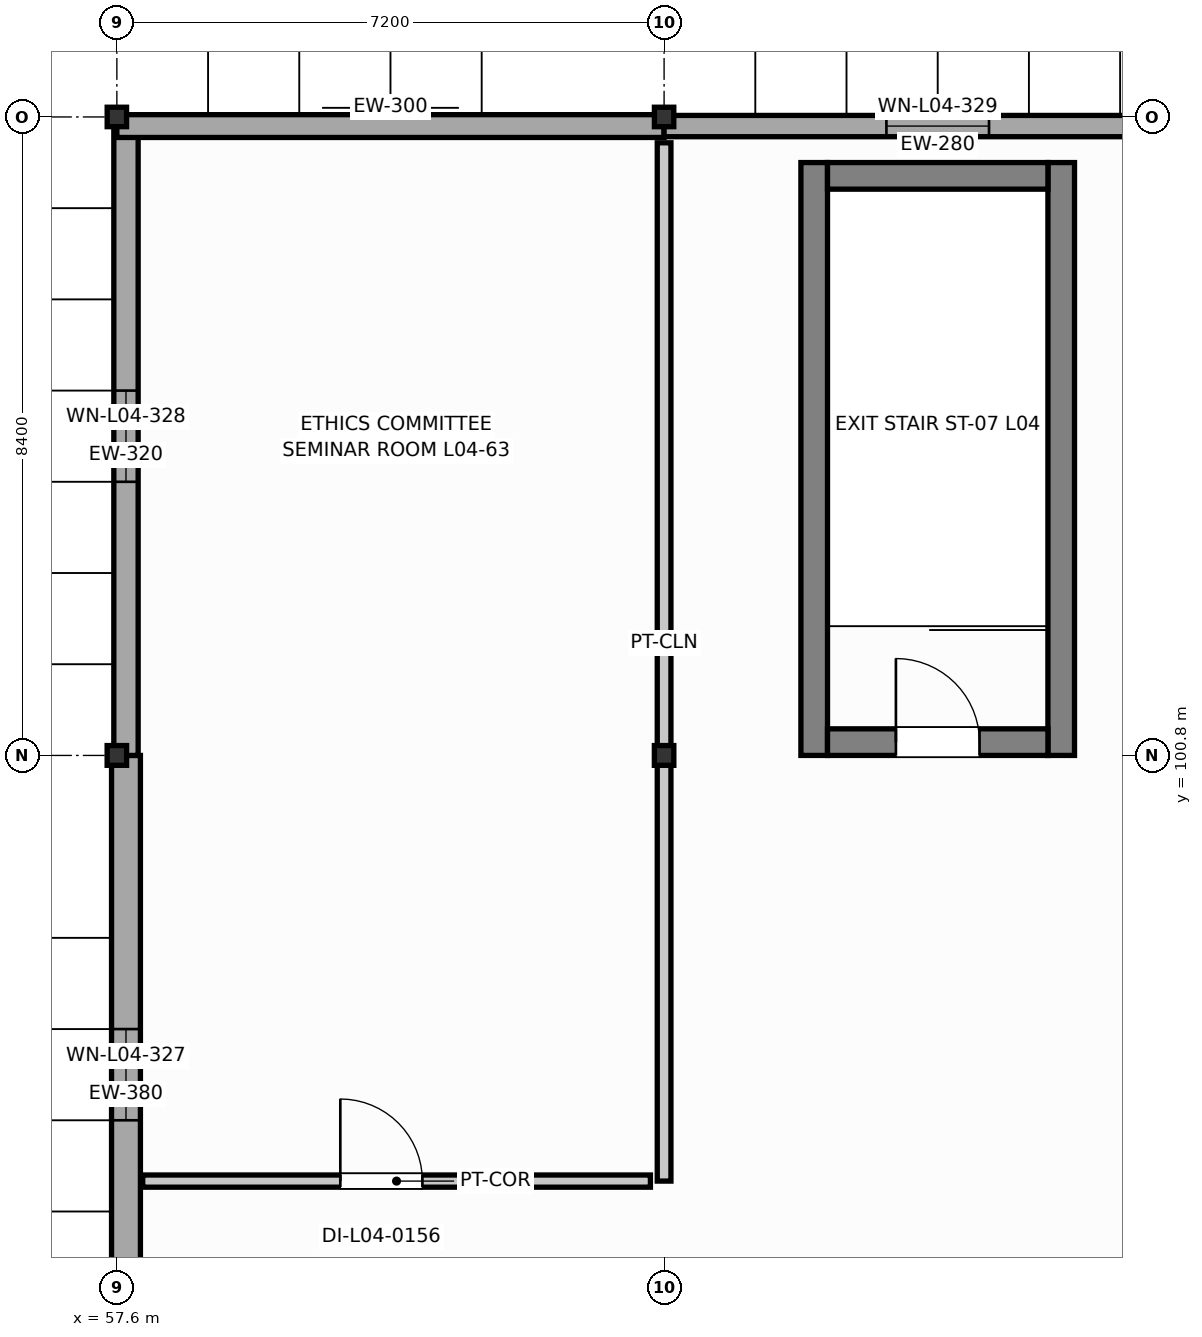
"""IFC4 building model, lengths in metres.
Left out: names, types, materials, properties, quantities, classifications, styles, units other than length and angle.
Written with IfcOpenShell. Run it as: python <this file> out.ifc"""

import sys

from ifc_helpers import new_model, si_unit, direction, frame, frame_2d, origin, origin_2d, place, context, subcontext, project, spatial, rectangle, i_section, extrude, element, fill, save


model = new_model("IFC4")
c1 = context("Model", 3, precision=1e-05, world=origin(), true_north=direction((0.0, 1.0)))
c2 = subcontext(c1, "Body", "Model", "MODEL_VIEW")
j1 = project(units=[si_unit("LENGTHUNIT", "METRE"), si_unit("PLANEANGLEUNIT", "RADIAN")], contexts=[c1])
p1 = place(None, origin())
s1 = spatial("IfcSite", under=j1, at=p1, CompositionType="ELEMENT")
p2 = place(p1, origin())
s2 = spatial("IfcBuilding", under=s1, at=p2, CompositionType="ELEMENT")
p3 = place(p2, frame((0.0, 0.0, 17.4)))
s3 = spatial("IfcBuildingStorey", under=s2, at=p3, CompositionType="ELEMENT", Elevation=17.4)
p4 = place(p3, frame((57.6, 100.8, 0.0), z_axis=(0.0, 0.0, 1.0), x_axis=(1.0, 0.0, 0.0)))
e1 = element("IfcColumn", 1, at=p4, inside=s3, PredefinedType="COLUMN", context=c2, shape_type="SweptSolid", body=[
    extrude(i_section(OverallWidth=0.256, OverallDepth=0.26, WebThickness=0.011, FlangeThickness=0.017, FilletRadius=0.013, at=origin_2d()), origin(), (0.0, 0.0, 1.0), 4.2),
])
p5 = place(p3, frame((57.6, 109.2, 0.0), z_axis=(0.0, 0.0, 1.0), x_axis=(1.0, 0.0, 0.0)))
e2 = element("IfcColumn", 2, at=p5, inside=s3, PredefinedType="COLUMN", context=c2, shape_type="SweptSolid", body=[
    extrude(i_section(OverallWidth=0.255, OverallDepth=0.256, WebThickness=0.01, FlangeThickness=0.016, FilletRadius=0.013, at=origin_2d()), origin(), (0.0, 0.0, 1.0), 4.2),
])
p6 = place(p3, frame((64.8, 100.8, 0.0), z_axis=(0.0, 0.0, 1.0), x_axis=(1.0, 0.0, 0.0)))
e3 = element("IfcColumn", 3, at=p6, inside=s3, PredefinedType="COLUMN", context=c2, shape_type="SweptSolid", body=[
    extrude(i_section(OverallWidth=0.256, OverallDepth=0.26, WebThickness=0.011, FlangeThickness=0.017, FilletRadius=0.013, at=origin_2d()), origin(), (0.0, 0.0, 1.0), 4.2),
])
p7 = place(p3, frame((64.8, 109.2, 0.0), z_axis=(0.0, 0.0, 1.0), x_axis=(1.0, 0.0, 0.0)))
e4 = element("IfcColumn", 4, at=p7, inside=s3, PredefinedType="COLUMN", context=c2, shape_type="SweptSolid", body=[
    extrude(i_section(OverallWidth=0.255, OverallDepth=0.256, WebThickness=0.01, FlangeThickness=0.016, FilletRadius=0.013, at=origin_2d()), origin(), (0.0, 0.0, 1.0), 4.2),
])
for number, where, z_axis, x_axis in (
    (5, (66.775, 100.8, 0.0), (0.0, 0.0, 1.0), (0.0, 1.0, 0.0)),
    (6, (70.025, 100.8, 0.0), (0.0, 0.0, 1.0), (0.0, 1.0, 0.0)),
):
    element("IfcWall", number, at=place(p3, frame(where, z_axis=z_axis, x_axis=x_axis)), inside=s3, PredefinedType="SHEAR", context=c2, shape_type="SweptSolid", body=[
        extrude(rectangle(XDim=7.8, YDim=0.35, at=frame_2d((3.9, 0.0))), origin(), (0.0, 0.0, 1.0), 4.0),
    ])
p8 = place(p3, frame((66.95, 108.425, 0.0), z_axis=(0.0, 0.0, 1.0), x_axis=(1.0, 0.0, 0.0)))
e7 = element("IfcWall", 7, at=p8, inside=s3, PredefinedType="SHEAR", context=c2, shape_type="SweptSolid", body=[
    extrude(rectangle(XDim=2.9, YDim=0.35, at=frame_2d((1.45, 0.0))), origin(), (0.0, 0.0, 1.0), 4.0),
])
p9 = place(p3, frame((66.95, 100.975, 0.0), z_axis=(0.0, 0.0, 1.0), x_axis=(1.0, 0.0, 0.0)))
e8 = element("IfcWall", 8, at=p9, inside=s3, PredefinedType="SHEAR", context=c2, shape_type="SweptSolid", body=[
    extrude(rectangle(XDim=2.9, YDim=0.35, at=frame_2d((1.45, 0.0))), origin(), (0.0, 0.0, 1.0), 4.0),
])
p10 = place(p9, frame((0.9, 0.0, 0.0)))
e9 = element("IfcOpeningElement", 9, at=p10, cuts=e8, PredefinedType="OPENING", context=c2, shape_type="SweptSolid", body=[
    extrude(rectangle(XDim=1.1, YDim=2.15, at=frame_2d((0.55, 1.075))), frame((0.0, 0.185, 0.0), z_axis=(0.0, -1.0, 0.0), x_axis=(1.0, 0.0, 0.0)), (0.0, 0.0, 1.0), 0.37),
])
p11 = place(p3, frame((57.72, 92.4, 0.0), z_axis=(0.0, 0.0, 1.0), x_axis=(0.0, 1.0, 0.0)))
e10 = element("IfcWall", 10, at=p11, inside=s3, PredefinedType="SOLIDWALL", context=c2, shape_type="SweptSolid", body=[
    extrude(rectangle(XDim=8.4, YDim=0.38, at=frame_2d((4.2, 0.0))), origin(), (0.0, 0.0, 1.0), 3.091),
])
p12 = place(p11, frame((3.6, 0.0, 0.95)))
e11 = element("IfcOpeningElement", 11, at=p12, cuts=e10, PredefinedType="OPENING", context=c2, shape_type="SweptSolid", body=[
    extrude(rectangle(XDim=1.2, YDim=1.55, at=frame_2d((0.6, 0.775))), frame((0.0, 0.2, 0.0), z_axis=(0.0, -1.0, 0.0), x_axis=(1.0, 0.0, 0.0)), (0.0, 0.0, 1.0), 0.4),
])
p13 = place(p3, frame((57.72, 100.8, 0.0), z_axis=(0.0, 0.0, 1.0), x_axis=(0.0, 1.0, 0.0)))
e12 = element("IfcWall", 12, at=p13, inside=s3, PredefinedType="SOLIDWALL", context=c2, shape_type="SweptSolid", body=[
    extrude(rectangle(XDim=8.4, YDim=0.32, at=frame_2d((4.2, 0.0))), origin(), (0.0, 0.0, 1.0), 3.091),
])
p14 = place(p13, frame((3.6, 0.0, 0.95)))
e13 = element("IfcOpeningElement", 13, at=p14, cuts=e12, PredefinedType="OPENING", context=c2, shape_type="SweptSolid", body=[
    extrude(rectangle(XDim=1.2, YDim=1.75, at=frame_2d((0.6, 0.875))), frame((0.0, 0.17, 0.0), z_axis=(0.0, -1.0, 0.0), x_axis=(1.0, 0.0, 0.0)), (0.0, 0.0, 1.0), 0.34),
])
p15 = place(p3, frame((57.6, 109.08, 0.0), z_axis=(0.0, 0.0, 1.0), x_axis=(1.0, 0.0, 0.0)))
e14 = element("IfcWall", 14, at=p15, inside=s3, PredefinedType="SOLIDWALL", context=c2, shape_type="SweptSolid", body=[
    extrude(rectangle(XDim=7.2, YDim=0.3, at=frame_2d((3.6, 0.0))), origin(), (0.0, 0.0, 1.0), 3.482),
])
p16 = place(p3, frame((64.8, 109.08, 0.0), z_axis=(0.0, 0.0, 1.0), x_axis=(1.0, 0.0, 0.0)))
e15 = element("IfcWall", 15, at=p16, inside=s3, PredefinedType="SOLIDWALL", context=c2, shape_type="SweptSolid", body=[
    extrude(rectangle(XDim=7.2, YDim=0.28, at=frame_2d((3.6, 0.0))), origin(), (0.0, 0.0, 1.0), 3.482),
])
p17 = place(p16, frame((2.925, 0.0, 0.95)))
e16 = element("IfcOpeningElement", 16, at=p17, cuts=e15, PredefinedType="OPENING", context=c2, shape_type="SweptSolid", body=[
    extrude(rectangle(XDim=1.35, YDim=1.15, at=frame_2d((0.675, 0.575))), frame((0.0, 0.15, 0.0), z_axis=(0.0, -1.0, 0.0), x_axis=(1.0, 0.0, 0.0)), (0.0, 0.0, 1.0), 0.3),
])
p18 = place(p3, frame((64.8, 108.86, 0.0), z_axis=(0.0, 0.0, 1.0), x_axis=(0.0, -1.0, 0.0)))
e17 = element("IfcWall", 17, at=p18, inside=s3, PredefinedType="PARTITIONING", context=c2, shape_type="SweptSolid", body=[
    extrude(rectangle(XDim=13.66, YDim=0.18, at=frame_2d((6.83, 0.0))), origin(), (0.0, 0.0, 1.0), 3.175),
])
p19 = place(p3, frame((64.62, 95.2, 0.0), z_axis=(0.0, 0.0, 1.0), x_axis=(-1.0, 0.0, 0.0)))
e18 = element("IfcWall", 18, at=p19, inside=s3, PredefinedType="PARTITIONING", context=c2, shape_type="SweptSolid", body=[
    extrude(rectangle(XDim=6.68, YDim=0.16, at=frame_2d((3.34, 0.0))), origin(), (0.0, 0.0, 1.0), 3.175),
])
p20 = place(p19, frame((3.0, 0.0, 0.0)))
e19 = element("IfcOpeningElement", 19, at=p20, cuts=e18, PredefinedType="OPENING", context=c2, shape_type="SweptSolid", body=[
    extrude(rectangle(XDim=1.08, YDim=2.15, at=frame_2d((0.54, 1.075))), frame((0.0, 0.09, 0.0), z_axis=(0.0, -1.0, 0.0), x_axis=(1.0, 0.0, 0.0)), (0.0, 0.0, 1.0), 0.18),
])
p21 = place(p10, origin())
e20 = element("IfcDoor", 20, at=p21, inside=s3, OperationType="SINGLE_SWING_LEFT", PredefinedType="DOOR", context=c2, shape_type="SweptSolid", body=[
    extrude(rectangle(XDim=1.1, YDim=2.15, at=frame_2d((0.55, 1.075))), frame((0.0, 0.025, 0.0), z_axis=(0.0, -1.0, 0.0), x_axis=(1.0, 0.0, 0.0)), (0.0, 0.0, 1.0), 0.05),
])
fill(e9, e20)
p22 = place(p12, origin())
e21 = element("IfcWindow", 21, at=p22, inside=s3, PartitioningType="SINGLE_PANEL", PredefinedType="WINDOW", context=c2, shape_type="SweptSolid", body=[
    extrude(rectangle(XDim=1.2, YDim=1.55, at=frame_2d((0.6, 0.775))), frame((0.0, 0.03, 0.0), z_axis=(0.0, -1.0, 0.0), x_axis=(1.0, 0.0, 0.0)), (0.0, 0.0, 1.0), 0.06),
])
fill(e11, e21)
p23 = place(p14, origin())
e22 = element("IfcWindow", 22, at=p23, inside=s3, PartitioningType="SINGLE_PANEL", PredefinedType="WINDOW", context=c2, shape_type="SweptSolid", body=[
    extrude(rectangle(XDim=1.2, YDim=1.75, at=frame_2d((0.6, 0.875))), frame((0.0, 0.03, 0.0), z_axis=(0.0, -1.0, 0.0), x_axis=(1.0, 0.0, 0.0)), (0.0, 0.0, 1.0), 0.06),
])
fill(e13, e22)
p24 = place(p17, origin())
e23 = element("IfcWindow", 23, at=p24, inside=s3, PartitioningType="SINGLE_PANEL", PredefinedType="WINDOW", context=c2, shape_type="SweptSolid", body=[
    extrude(rectangle(XDim=1.35, YDim=1.15, at=frame_2d((0.675, 0.575))), frame((0.0, 0.03, 0.0), z_axis=(0.0, -1.0, 0.0), x_axis=(1.0, 0.0, 0.0)), (0.0, 0.0, 1.0), 0.06),
])
fill(e16, e23)
p25 = place(p20, frame((1.08, 0.0, 0.0), z_axis=(0.0, 0.0, 1.0), x_axis=(-1.0, 0.0, 0.0)))
e24 = element("IfcDoor", 24, at=p25, inside=s3, OperationType="SINGLE_SWING_LEFT", PredefinedType="DOOR", context=c2, shape_type="SweptSolid", body=[
    extrude(rectangle(XDim=1.08, YDim=2.15, at=frame_2d((0.54, 1.075))), frame((0.0, 0.025, 0.0), z_axis=(0.0, -1.0, 0.0), x_axis=(1.0, 0.0, 0.0)), (0.0, 0.0, 1.0), 0.05),
])
fill(e19, e24)
save(model, sys.argv[1])
